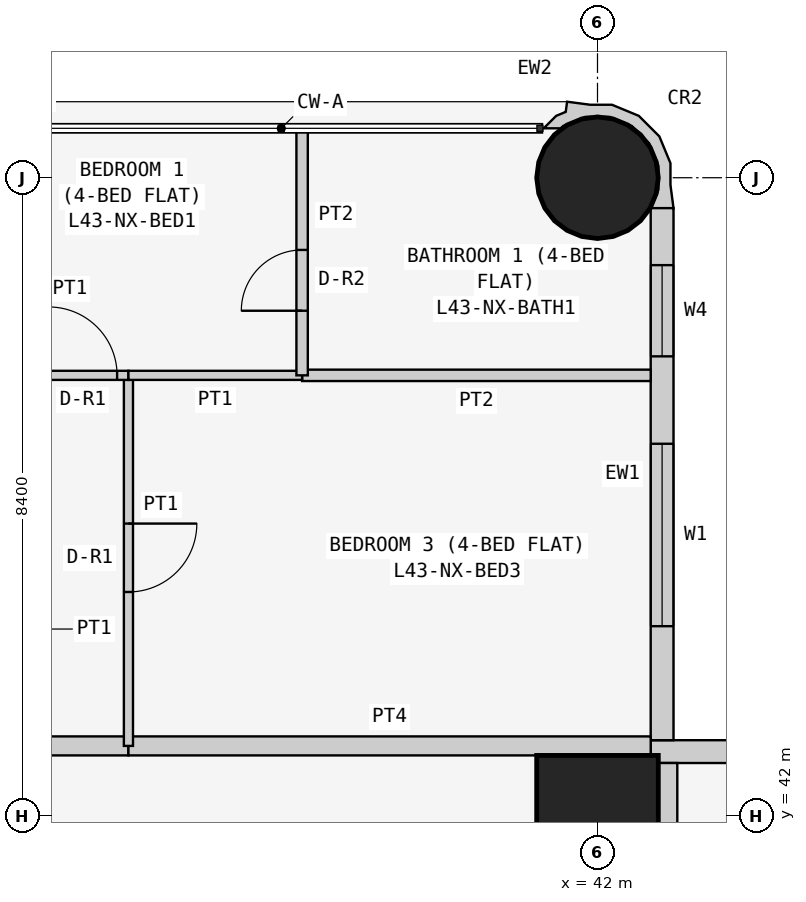
"""IFC4 building model, lengths in metres.
Left out: names, types, materials, properties, quantities, classifications, styles, units other than length and angle.
Written with IfcOpenShell. Run it as: python <this file> out.ifc"""

import sys

from ifc_helpers import new_model, si_unit, direction, frame, frame_2d, origin, origin_2d, place, context, subcontext, project, spatial, polyline, rectangle, circle, outline, extrude, element, fill, save


model = new_model("IFC4")
c1 = context("Model", 3, precision=1e-05, world=origin(), true_north=direction((0.0, 1.0)))
c2 = subcontext(c1, "Body", "Model", "MODEL_VIEW")
j1 = project(units=[si_unit("LENGTHUNIT", "METRE"), si_unit("PLANEANGLEUNIT", "RADIAN")], contexts=[c1])
p1 = place(None, origin())
s1 = spatial("IfcSite", under=j1, at=p1, CompositionType="ELEMENT")
p2 = place(p1, origin())
s2 = spatial("IfcBuilding", under=s1, at=p2, CompositionType="ELEMENT")
p3 = place(p2, frame((0.0, 0.0, 166.5)))
s3 = spatial("IfcBuildingStorey", under=s2, at=p3, CompositionType="ELEMENT", Elevation=166.5)
p4 = place(p3, frame((42.0, 42.0, 0.0), z_axis=(0.0, 0.0, 1.0), x_axis=(1.0, 0.0, 0.0)))
e1 = element("IfcColumn", 1, at=p4, inside=s3, PredefinedType="COLUMN", context=c2, shape_type="SweptSolid", body=[
    extrude(rectangle(XDim=1.6, YDim=1.6, at=origin_2d()), origin(), (0.0, 0.0, 1.0), 3.6),
])
p5 = place(p3, frame((42.0, 50.4, 0.0), z_axis=(0.0, 0.0, 1.0), x_axis=(1.0, 0.0, 0.0)))
e2 = element("IfcColumn", 2, at=p5, inside=s3, PredefinedType="COLUMN", context=c2, shape_type="SweptSolid", body=[
    extrude(circle(Radius=0.8, at=origin_2d()), origin(), (0.0, 0.0, 1.0), 3.6),
])
p6 = place(p3, frame((58.4, 42.85, 0.0), z_axis=(0.0, 0.0, 1.0), x_axis=(-1.0, 0.0, 0.0)))
e3 = element("IfcWall", 3, at=p6, inside=s3, PredefinedType="SOLIDWALL", context=c2, shape_type="SweptSolid", body=[
    extrude(rectangle(XDim=15.7, YDim=0.3, at=frame_2d((7.85, 0.0))), origin(), (0.0, 0.0, 1.0), 3.45),
])
p7 = place(p6, frame((12.4, 0.0, 0.9)))
e4 = element("IfcOpeningElement", 4, at=p7, cuts=e3, PredefinedType="OPENING", context=c2, shape_type="SweptSolid", body=[
    extrude(rectangle(XDim=1.8, YDim=1.5, at=frame_2d((0.9, 0.75))), frame((0.0, 0.16, 0.0), z_axis=(0.0, -1.0, 0.0), x_axis=(1.0, 0.0, 0.0)), (0.0, 0.0, 1.0), 0.32),
])
p8 = place(p6, frame((9.55, 0.0, 1.5)))
e5 = element("IfcOpeningElement", 5, at=p8, cuts=e3, PredefinedType="OPENING", context=c2, shape_type="SweptSolid", body=[
    extrude(rectangle(XDim=0.9, YDim=0.7, at=frame_2d((0.45, 0.35))), frame((0.0, 0.16, 0.0), z_axis=(0.0, -1.0, 0.0), x_axis=(1.0, 0.0, 0.0)), (0.0, 0.0, 1.0), 0.32),
])
p9 = place(p6, frame((5.1, 0.0, 0.9)))
e6 = element("IfcOpeningElement", 6, at=p9, cuts=e3, PredefinedType="OPENING", context=c2, shape_type="SweptSolid", body=[
    extrude(rectangle(XDim=1.8, YDim=1.5, at=frame_2d((0.9, 0.75))), frame((0.0, 0.16, 0.0), z_axis=(0.0, -1.0, 0.0), x_axis=(1.0, 0.0, 0.0)), (0.0, 0.0, 1.0), 0.32),
])
p10 = place(p6, frame((2.0, 0.0, 0.0)))
e7 = element("IfcOpeningElement", 7, at=p10, cuts=e3, PredefinedType="OPENING", context=c2, shape_type="SweptSolid", body=[
    extrude(rectangle(XDim=0.9, YDim=2.4, at=frame_2d((0.45, 1.2))), frame((0.0, 0.16, 0.0), z_axis=(0.0, -1.0, 0.0), x_axis=(1.0, 0.0, 0.0)), (0.0, 0.0, 1.0), 0.32),
])
p11 = place(p6, frame((0.7, 0.0, 0.9)))
e8 = element("IfcOpeningElement", 8, at=p11, cuts=e3, PredefinedType="OPENING", context=c2, shape_type="SweptSolid", body=[
    extrude(rectangle(XDim=1.2, YDim=1.5, at=frame_2d((0.6, 0.75))), frame((0.0, 0.16, 0.0), z_axis=(0.0, -1.0, 0.0), x_axis=(1.0, 0.0, 0.0)), (0.0, 0.0, 1.0), 0.32),
])
p12 = place(p3, frame((42.85, 43.0, 0.0), z_axis=(0.0, 0.0, 1.0), x_axis=(0.0, 1.0, 0.0)))
e9 = element("IfcWall", 9, at=p12, inside=s3, PredefinedType="SOLIDWALL", context=c2, shape_type="SweptSolid", body=[
    extrude(rectangle(XDim=7.0, YDim=0.3, at=frame_2d((3.5, 0.0))), origin(), (0.0, 0.0, 1.0), 3.45),
])
p13 = place(p12, frame((1.5, 0.0, 0.9)))
e10 = element("IfcOpeningElement", 10, at=p13, cuts=e9, PredefinedType="OPENING", context=c2, shape_type="SweptSolid", body=[
    extrude(rectangle(XDim=2.4, YDim=1.5, at=frame_2d((1.2, 0.75))), frame((0.0, 0.16, 0.0), z_axis=(0.0, -1.0, 0.0), x_axis=(1.0, 0.0, 0.0)), (0.0, 0.0, 1.0), 0.32),
])
p14 = place(p12, frame((5.05, 0.0, 0.9)))
e11 = element("IfcOpeningElement", 11, at=p14, cuts=e9, PredefinedType="OPENING", context=c2, shape_type="SweptSolid", body=[
    extrude(rectangle(XDim=1.2, YDim=1.5, at=frame_2d((0.6, 0.75))), frame((0.0, 0.16, 0.0), z_axis=(0.0, -1.0, 0.0), x_axis=(1.0, 0.0, 0.0)), (0.0, 0.0, 1.0), 0.32),
])
p15 = place(p3, frame((42.817, 50.073, 0.0), z_axis=(0.0, 0.0, 1.0), x_axis=(0.343276641956, 0.93923434088, 0.0)))
e12 = element("IfcWall", 12, at=p15, inside=s3, PredefinedType="SOLIDWALL", context=c2, shape_type="SweptSolid", body=[
    extrude(outline(polyline([(0.266, -0.055), (0.535, 0.044), (0.817, 0.302), (0.978, 0.648), (0.994, 1.03), (0.895, 1.3), (0.828, 1.598), (0.697, 1.569), (0.604, 1.67), (0.394, 1.767), (0.471, 1.556), (0.509, 1.539), (0.724, 1.304), (0.833, 1.005), (0.82, 0.687), (0.686, 0.397), (0.451, 0.182), (0.152, 0.073), (-0.116, 0.084), (-0.128, 0.078), (-0.146, 0.071), (-0.006, -0.197), (0.266, -0.055)])), origin(), (0.0, 0.0, 1.0), 3.45),
])
p16 = place(p3, frame((34.629, 42.925, 0.0), z_axis=(0.0, 0.0, 1.0), x_axis=(1.0, 0.0, 0.0)))
e13 = element("IfcWall", 13, at=p16, inside=s3, PredefinedType="PARTITIONING", context=c2, shape_type="SweptSolid", body=[
    extrude(rectangle(XDim=1.2, YDim=0.25, at=frame_2d((0.6, 0.0))), origin(), (0.0, 0.0, 1.0), 3.45),
])
p17 = place(p3, frame((35.829, 42.925, 0.0), z_axis=(0.0, 0.0, 1.0), x_axis=(1.0, 0.0, 0.0)))
e14 = element("IfcWall", 14, at=p17, inside=s3, PredefinedType="PARTITIONING", context=c2, shape_type="SweptSolid", body=[
    extrude(rectangle(XDim=6.871, YDim=0.25, at=frame_2d((3.436, 0.0))), origin(), (0.0, 0.0, 1.0), 3.45),
])
p18 = place(p3, frame((42.925, 42.7, 0.0), z_axis=(0.0, 0.0, 1.0), x_axis=(0.0, -1.0, 0.0)))
e15 = element("IfcWall", 15, at=p18, inside=s3, PredefinedType="PARTITIONING", context=c2, shape_type="SweptSolid", body=[
    extrude(rectangle(XDim=6.471, YDim=0.25, at=frame_2d((3.235, 0.0))), origin(), (0.0, 0.0, 1.0), 3.45),
])
p19 = place(p3, frame((35.829, 47.8, 0.0), z_axis=(0.0, 0.0, 1.0), x_axis=(0.0, -1.0, 0.0)))
e16 = element("IfcWall", 16, at=p19, inside=s3, PredefinedType="PARTITIONING", context=c2, shape_type="SweptSolid", body=[
    extrude(rectangle(XDim=4.875, YDim=0.12, at=frame_2d((2.438, 0.0))), origin(), (0.0, 0.0, 1.0), 3.45),
])
p20 = place(p19, frame((1.95, 0.0, 0.0)))
e17 = element("IfcOpeningElement", 17, at=p20, cuts=e16, PredefinedType="OPENING", context=c2, shape_type="SweptSolid", body=[
    extrude(rectangle(XDim=0.9, YDim=2.1, at=frame_2d((0.45, 1.05))), frame((0.0, 0.07, 0.0), z_axis=(0.0, -1.0, 0.0), x_axis=(1.0, 0.0, 0.0)), (0.0, 0.0, 1.0), 0.14),
])
p21 = place(p3, frame((34.629, 47.8, 0.0), z_axis=(0.0, 0.0, 1.0), x_axis=(1.0, 0.0, 0.0)))
e18 = element("IfcWall", 18, at=p21, inside=s3, PredefinedType="PARTITIONING", context=c2, shape_type="SweptSolid", body=[
    extrude(rectangle(XDim=1.2, YDim=0.12, at=frame_2d((0.6, 0.0))), origin(), (0.0, 0.0, 1.0), 3.45),
])
p22 = place(p21, frame((0.151, 0.0, 0.0)))
e19 = element("IfcOpeningElement", 19, at=p22, cuts=e18, PredefinedType="OPENING", context=c2, shape_type="SweptSolid", body=[
    extrude(rectangle(XDim=0.9, YDim=2.1, at=frame_2d((0.45, 1.05))), frame((0.0, 0.07, 0.0), z_axis=(0.0, -1.0, 0.0), x_axis=(1.0, 0.0, 0.0)), (0.0, 0.0, 1.0), 0.14),
])
p23 = place(p3, frame((42.7, 47.8, 0.0), z_axis=(0.0, 0.0, 1.0), x_axis=(-1.0, 0.0, 0.0)))
e20 = element("IfcWall", 20, at=p23, inside=s3, PredefinedType="PARTITIONING", context=c2, shape_type="SweptSolid", body=[
    extrude(rectangle(XDim=4.586, YDim=0.15, at=frame_2d((2.293, 0.0))), origin(), (0.0, 0.0, 1.0), 3.45),
])
p24 = place(p3, frame((38.114, 47.8, 0.0), z_axis=(0.0, 0.0, 1.0), x_axis=(-1.0, 0.0, 0.0)))
e21 = element("IfcWall", 21, at=p24, inside=s3, PredefinedType="PARTITIONING", context=c2, shape_type="SweptSolid", body=[
    extrude(rectangle(XDim=2.285, YDim=0.12, at=frame_2d((1.143, 0.0))), origin(), (0.0, 0.0, 1.0), 3.45),
])
p25 = place(p3, frame((38.114, 51.05, 0.0), z_axis=(0.0, 0.0, 1.0), x_axis=(0.0, -1.0, 0.0)))
e22 = element("IfcWall", 22, at=p25, inside=s3, PredefinedType="PARTITIONING", context=c2, shape_type="SweptSolid", body=[
    extrude(rectangle(XDim=3.25, YDim=0.15, at=frame_2d((1.625, 0.0))), origin(), (0.0, 0.0, 1.0), 3.45),
])
p26 = place(p25, frame((1.6, 0.0, 0.0)))
e23 = element("IfcOpeningElement", 23, at=p26, cuts=e22, PredefinedType="OPENING", context=c2, shape_type="SweptSolid", body=[
    extrude(rectangle(XDim=0.8, YDim=2.1, at=frame_2d((0.4, 1.05))), frame((0.0, 0.085, 0.0), z_axis=(0.0, -1.0, 0.0), x_axis=(1.0, 0.0, 0.0)), (0.0, 0.0, 1.0), 0.17),
])
p27 = place(p13, origin())
e24 = element("IfcWindow", 24, at=p27, inside=s3, PartitioningType="SINGLE_PANEL", PredefinedType="WINDOW", context=c2, shape_type="SweptSolid", body=[
    extrude(rectangle(XDim=2.4, YDim=1.5, at=frame_2d((1.2, 0.75))), frame((0.0, 0.03, 0.0), z_axis=(0.0, -1.0, 0.0), x_axis=(1.0, 0.0, 0.0)), (0.0, 0.0, 1.0), 0.06),
])
fill(e10, e24)
p28 = place(p14, origin())
e25 = element("IfcWindow", 25, at=p28, inside=s3, PartitioningType="SINGLE_PANEL", PredefinedType="WINDOW", context=c2, shape_type="SweptSolid", body=[
    extrude(rectangle(XDim=1.2, YDim=1.5, at=frame_2d((0.6, 0.75))), frame((0.0, 0.03, 0.0), z_axis=(0.0, -1.0, 0.0), x_axis=(1.0, 0.0, 0.0)), (0.0, 0.0, 1.0), 0.06),
])
fill(e11, e25)
p29 = place(p20, origin())
e26 = element("IfcDoor", 26, at=p29, inside=s3, OperationType="SINGLE_SWING_LEFT", PredefinedType="DOOR", context=c2, shape_type="SweptSolid", body=[
    extrude(rectangle(XDim=0.9, YDim=2.1, at=frame_2d((0.45, 1.05))), frame((0.0, 0.025, 0.0), z_axis=(0.0, -1.0, 0.0), x_axis=(1.0, 0.0, 0.0)), (0.0, 0.0, 1.0), 0.05),
])
fill(e17, e26)
p30 = place(p22, origin())
e27 = element("IfcDoor", 27, at=p30, inside=s3, OperationType="SINGLE_SWING_LEFT", PredefinedType="DOOR", context=c2, shape_type="SweptSolid", body=[
    extrude(rectangle(XDim=0.9, YDim=2.1, at=frame_2d((0.45, 1.05))), frame((0.0, 0.025, 0.0), z_axis=(0.0, -1.0, 0.0), x_axis=(1.0, 0.0, 0.0)), (0.0, 0.0, 1.0), 0.05),
])
fill(e19, e27)
p31 = place(p26, frame((0.8, 0.0, 0.0), z_axis=(0.0, 0.0, 1.0), x_axis=(-1.0, 0.0, 0.0)))
e28 = element("IfcDoor", 28, at=p31, inside=s3, OperationType="SINGLE_SWING_LEFT", PredefinedType="DOOR", context=c2, shape_type="SweptSolid", body=[
    extrude(rectangle(XDim=0.8, YDim=2.1, at=frame_2d((0.4, 1.05))), frame((0.0, 0.025, 0.0), z_axis=(0.0, -1.0, 0.0), x_axis=(1.0, 0.0, 0.0)), (0.0, 0.0, 1.0), 0.05),
])
fill(e23, e28)
save(model, sys.argv[1])
